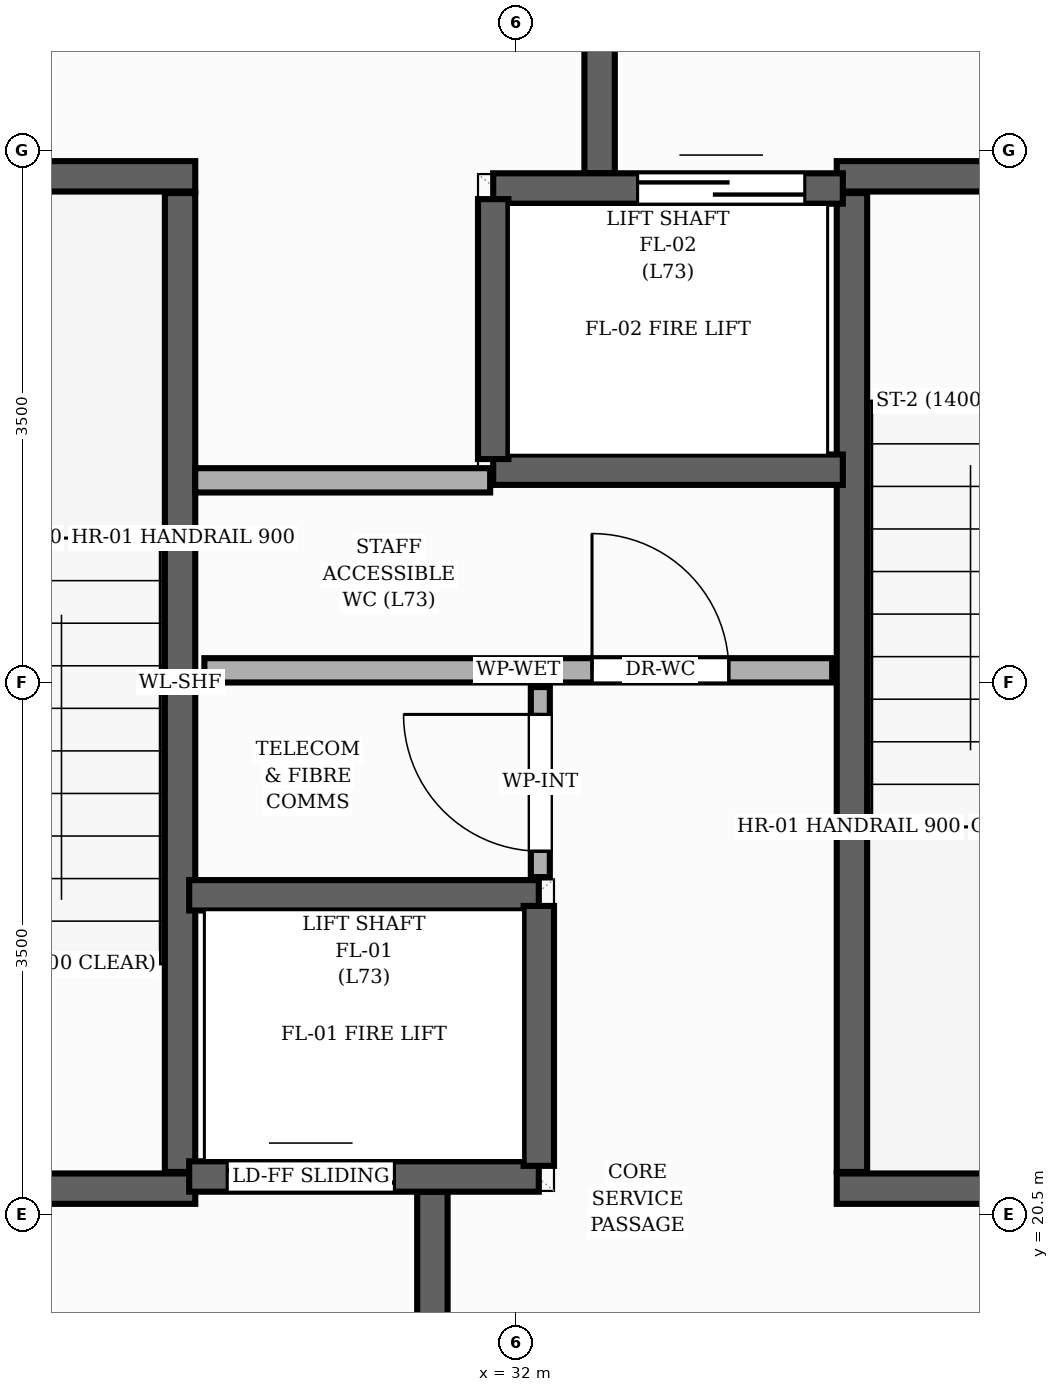
"""IFC4 building model, lengths in metres.
Left out: names, types, materials, properties, quantities, classifications, styles, units other than length and angle.
Written with IfcOpenShell. Run it as: python <this file> out.ifc"""

import sys

from ifc_helpers import new_model, si_unit, direction, frame, frame_2d, origin, place, context, subcontext, project, spatial, rectangle, extrude, element, fill, save


model = new_model("IFC4")
c1 = context("Model", 3, precision=1e-05, world=origin(), true_north=direction((0.0, 1.0)))
c2 = subcontext(c1, "Body", "Model", "MODEL_VIEW")
j1 = project(units=[si_unit("LENGTHUNIT", "METRE"), si_unit("PLANEANGLEUNIT", "RADIAN")], contexts=[c1])
p1 = place(None, origin())
s1 = spatial("IfcSite", under=j1, at=p1, CompositionType="ELEMENT")
p2 = place(p1, origin())
s2 = spatial("IfcBuilding", under=s1, at=p2, CompositionType="ELEMENT")
p3 = place(p2, frame((0.0, 0.0, 243.04)))
s3 = spatial("IfcBuildingStorey", under=s2, at=p3, CompositionType="ELEMENT", Elevation=243.04)
p4 = place(p3, frame((29.79, 20.78, 0.0), z_axis=(0.0, 0.0, 1.0), x_axis=(0.0, 1.0, 0.0)))
e1 = element("IfcWall", 1, at=p4, inside=s3, PredefinedType="SHEAR", context=c2, shape_type="SweptSolid", body=[
    extrude(rectangle(XDim=6.44, YDim=0.2, at=frame_2d((3.22, 0.0))), origin(), (0.0, 0.0, 1.0), 3.84),
])
p5 = place(p3, frame((26.65, 27.33, 0.0), z_axis=(0.0, 0.0, 1.0), x_axis=(1.0, 0.0, 0.0)))
e2 = element("IfcWall", 2, at=p5, inside=s3, PredefinedType="SHEAR", context=c2, shape_type="SweptSolid", body=[
    extrude(rectangle(XDim=3.24, YDim=0.2, at=frame_2d((1.62, 0.0))), origin(), (0.0, 0.0, 1.0), 3.84),
])
p6 = place(p3, frame((26.65, 20.67, 0.0), z_axis=(0.0, 0.0, 1.0), x_axis=(1.0, 0.0, 0.0)))
e3 = element("IfcWall", 3, at=p6, inside=s3, PredefinedType="SHEAR", context=c2, shape_type="SweptSolid", body=[
    extrude(rectangle(XDim=3.24, YDim=0.2, at=frame_2d((1.62, 0.0))), origin(), (0.0, 0.0, 1.0), 3.84),
])
p7 = place(p6, frame((1.055, 0.0, 0.0)))
e4 = element("IfcOpeningElement", 4, at=p7, cuts=e3, PredefinedType="OPENING", context=c2, shape_type="SweptSolid", body=[
    extrude(rectangle(XDim=1.05, YDim=2.15, at=frame_2d((0.525, 1.075))), frame((0.0, 0.11, 0.0), z_axis=(0.0, -1.0, 0.0), x_axis=(1.0, 0.0, 0.0)), (0.0, 0.0, 1.0), 0.22),
])
p8 = place(p3, frame((34.21, 20.78, 0.0), z_axis=(0.0, 0.0, 1.0), x_axis=(0.0, 1.0, 0.0)))
e5 = element("IfcWall", 5, at=p8, inside=s3, PredefinedType="SHEAR", context=c2, shape_type="SweptSolid", body=[
    extrude(rectangle(XDim=6.44, YDim=0.2, at=frame_2d((3.22, 0.0))), origin(), (0.0, 0.0, 1.0), 3.84),
])
p9 = place(p3, frame((34.11, 20.67, 0.0), z_axis=(0.0, 0.0, 1.0), x_axis=(1.0, 0.0, 0.0)))
e6 = element("IfcWall", 6, at=p9, inside=s3, PredefinedType="SHEAR", context=c2, shape_type="SweptSolid", body=[
    extrude(rectangle(XDim=3.24, YDim=0.2, at=frame_2d((1.62, 0.0))), origin(), (0.0, 0.0, 1.0), 3.84),
])
p10 = place(p3, frame((34.11, 27.33, 0.0), z_axis=(0.0, 0.0, 1.0), x_axis=(1.0, 0.0, 0.0)))
e7 = element("IfcWall", 7, at=p10, inside=s3, PredefinedType="SHEAR", context=c2, shape_type="SweptSolid", body=[
    extrude(rectangle(XDim=3.24, YDim=0.2, at=frame_2d((1.62, 0.0))), origin(), (0.0, 0.0, 1.0), 3.84),
])
p11 = place(p10, frame((1.135, 0.0, 0.0)))
e8 = element("IfcOpeningElement", 8, at=p11, cuts=e7, PredefinedType="OPENING", context=c2, shape_type="SweptSolid", body=[
    extrude(rectangle(XDim=1.05, YDim=2.15, at=frame_2d((0.525, 1.075))), frame((0.0, 0.11, 0.0), z_axis=(0.0, -1.0, 0.0), x_axis=(1.0, 0.0, 0.0)), (0.0, 0.0, 1.0), 0.22),
])
for number, where, z_axis, x_axis in (
    (9, (31.45, 17.15, 0.0), (0.0, 0.0, 1.0), (0.0, 1.0, 0.0)),
    (10, (32.55, 27.35, 0.0), (0.0, 0.0, 1.0), (0.0, 1.0, 0.0)),
):
    element("IfcWall", number, at=place(p3, frame(where, z_axis=z_axis, x_axis=x_axis)), inside=s3, PredefinedType="SHEAR", context=c2, shape_type="SweptSolid", body=[
        extrude(rectangle(XDim=3.5, YDim=0.2, at=frame_2d((1.75, 0.0))), origin(), (0.0, 0.0, 1.0), 3.84),
    ])
p12 = place(p3, frame((29.85, 20.75, 0.0), z_axis=(0.0, 0.0, 1.0), x_axis=(1.0, 0.0, 0.0)))
e11 = element("IfcWall", 11, at=p12, inside=s3, PredefinedType="SHEAR", context=c2, shape_type="SweptSolid", body=[
    extrude(rectangle(XDim=2.3, YDim=0.2, at=frame_2d((1.15, 0.0))), origin(), (0.0, 0.0, 1.0), 3.84),
])
p13 = place(p12, frame((0.25, 0.0, 0.0)))
e12 = element("IfcOpeningElement", 12, at=p13, cuts=e11, PredefinedType="OPENING", context=c2, shape_type="SweptSolid", body=[
    extrude(rectangle(XDim=1.1, YDim=2.15, at=frame_2d((0.55, 1.075))), frame((0.0, 0.11, 0.0), z_axis=(0.0, -1.0, 0.0), x_axis=(1.0, 0.0, 0.0)), (0.0, 0.0, 1.0), 0.22),
])
p14 = place(p3, frame((29.85, 22.6, 0.0), z_axis=(0.0, 0.0, 1.0), x_axis=(1.0, 0.0, 0.0)))
e13 = element("IfcWall", 13, at=p14, inside=s3, PredefinedType="SHEAR", context=c2, shape_type="SweptSolid", body=[
    extrude(rectangle(XDim=2.3, YDim=0.2, at=frame_2d((1.15, 0.0))), origin(), (0.0, 0.0, 1.0), 3.84),
])
p15 = place(p3, frame((32.15, 20.82, 0.0), z_axis=(0.0, 0.0, 1.0), x_axis=(0.0, 1.0, 0.0)))
e14 = element("IfcWall", 14, at=p15, inside=s3, PredefinedType="SHEAR", context=c2, shape_type="SweptSolid", body=[
    extrude(rectangle(XDim=1.71, YDim=0.2, at=frame_2d((0.855, 0.0))), origin(), (0.0, 0.0, 1.0), 3.84),
])
p16 = place(p3, frame((31.85, 27.25, 0.0), z_axis=(0.0, 0.0, 1.0), x_axis=(1.0, 0.0, 0.0)))
e15 = element("IfcWall", 15, at=p16, inside=s3, PredefinedType="SHEAR", context=c2, shape_type="SweptSolid", body=[
    extrude(rectangle(XDim=2.3, YDim=0.2, at=frame_2d((1.15, 0.0))), origin(), (0.0, 0.0, 1.0), 3.84),
])
p17 = place(p16, frame((0.95, 0.0, 0.0)))
e16 = element("IfcOpeningElement", 16, at=p17, cuts=e15, PredefinedType="OPENING", context=c2, shape_type="SweptSolid", body=[
    extrude(rectangle(XDim=1.1, YDim=2.15, at=frame_2d((0.55, 1.075))), frame((0.0, 0.11, 0.0), z_axis=(0.0, -1.0, 0.0), x_axis=(1.0, 0.0, 0.0)), (0.0, 0.0, 1.0), 0.22),
])
p18 = place(p3, frame((31.85, 25.4, 0.0), z_axis=(0.0, 0.0, 1.0), x_axis=(1.0, 0.0, 0.0)))
e17 = element("IfcWall", 17, at=p18, inside=s3, PredefinedType="SHEAR", context=c2, shape_type="SweptSolid", body=[
    extrude(rectangle(XDim=2.3, YDim=0.2, at=frame_2d((1.15, 0.0))), origin(), (0.0, 0.0, 1.0), 3.84),
])
p19 = place(p3, frame((31.85, 25.47, 0.0), z_axis=(0.0, 0.0, 1.0), x_axis=(0.0, 1.0, 0.0)))
e18 = element("IfcWall", 18, at=p19, inside=s3, PredefinedType="SHEAR", context=c2, shape_type="SweptSolid", body=[
    extrude(rectangle(XDim=1.71, YDim=0.2, at=frame_2d((0.855, 0.0))), origin(), (0.0, 0.0, 1.0), 3.84),
])
p20 = place(p3, frame((29.95, 24.08, 0.0), z_axis=(0.0, 0.0, 1.0), x_axis=(1.0, 0.0, 0.0)))
e19 = element("IfcWall", 19, at=p20, inside=s3, PredefinedType="PLUMBINGWALL", context=c2, shape_type="SweptSolid", body=[
    extrude(rectangle(XDim=4.13, YDim=0.16, at=frame_2d((2.065, 0.0))), origin(), (0.0, 0.0, 1.0), 3.515),
])
p21 = place(p20, frame((2.55, 0.0, 0.0)))
e20 = element("IfcOpeningElement", 20, at=p21, cuts=e19, PredefinedType="OPENING", context=c2, shape_type="SweptSolid", body=[
    extrude(rectangle(XDim=0.9, YDim=2.1, at=frame_2d((0.45, 1.05))), frame((0.0, 0.09, 0.0), z_axis=(0.0, -1.0, 0.0), x_axis=(1.0, 0.0, 0.0)), (0.0, 0.0, 1.0), 0.18),
])
p22 = place(p3, frame((32.16, 22.72, 0.0), z_axis=(0.0, 0.0, 1.0), x_axis=(0.0, 1.0, 0.0)))
e21 = element("IfcWall", 21, at=p22, inside=s3, PredefinedType="PARTITIONING", context=c2, shape_type="SweptSolid", body=[
    extrude(rectangle(XDim=1.25, YDim=0.125, at=frame_2d((0.625, 0.0))), origin(), (0.0, 0.0, 1.0), 3.515),
])
p23 = place(p22, frame((0.17, 0.0, 0.0)))
e22 = element("IfcOpeningElement", 22, at=p23, cuts=e21, PredefinedType="OPENING", context=c2, shape_type="SweptSolid", body=[
    extrude(rectangle(XDim=0.9, YDim=2.1, at=frame_2d((0.45, 1.05))), frame((0.0, 0.073, 0.0), z_axis=(0.0, -1.0, 0.0), x_axis=(1.0, 0.0, 0.0)), (0.0, 0.0, 1.0), 0.145),
])
p24 = place(p3, frame((29.89, 25.33, 0.0), z_axis=(0.0, 0.0, 1.0), x_axis=(1.0, 0.0, 0.0)))
e23 = element("IfcWall", 23, at=p24, inside=s3, PredefinedType="PLUMBINGWALL", context=c2, shape_type="SweptSolid", body=[
    extrude(rectangle(XDim=1.94, YDim=0.16, at=frame_2d((0.97, 0.0))), origin(), (0.0, 0.0, 1.0), 3.515),
])
p25 = place(p13, origin())
e24 = element("IfcDoor", 24, at=p25, inside=s3, OperationType="DOUBLE_DOOR_SLIDING", PredefinedType="DOOR", context=c2, shape_type="SweptSolid", body=[
    extrude(rectangle(XDim=1.1, YDim=2.15, at=frame_2d((0.55, 1.075))), frame((0.0, 0.025, 0.0), z_axis=(0.0, -1.0, 0.0), x_axis=(1.0, 0.0, 0.0)), (0.0, 0.0, 1.0), 0.05),
])
fill(e12, e24)
p26 = place(p17, origin())
e25 = element("IfcDoor", 25, at=p26, inside=s3, OperationType="DOUBLE_DOOR_SLIDING", PredefinedType="DOOR", context=c2, shape_type="SweptSolid", body=[
    extrude(rectangle(XDim=1.1, YDim=2.15, at=frame_2d((0.55, 1.075))), frame((0.0, 0.025, 0.0), z_axis=(0.0, -1.0, 0.0), x_axis=(1.0, 0.0, 0.0)), (0.0, 0.0, 1.0), 0.05),
])
fill(e16, e25)
p27 = place(p21, origin())
e26 = element("IfcDoor", 26, at=p27, inside=s3, OperationType="SINGLE_SWING_LEFT", PredefinedType="DOOR", context=c2, shape_type="SweptSolid", body=[
    extrude(rectangle(XDim=0.9, YDim=2.1, at=frame_2d((0.45, 1.05))), frame((0.0, 0.025, 0.0), z_axis=(0.0, -1.0, 0.0), x_axis=(1.0, 0.0, 0.0)), (0.0, 0.0, 1.0), 0.05),
])
fill(e20, e26)
p28 = place(p23, origin())
e27 = element("IfcDoor", 27, at=p28, inside=s3, OperationType="SINGLE_SWING_RIGHT", PredefinedType="DOOR", context=c2, shape_type="SweptSolid", body=[
    extrude(rectangle(XDim=0.9, YDim=2.1, at=frame_2d((0.45, 1.05))), frame((0.0, 0.025, 0.0), z_axis=(0.0, -1.0, 0.0), x_axis=(1.0, 0.0, 0.0)), (0.0, 0.0, 1.0), 0.05),
])
fill(e22, e27)
save(model, sys.argv[1])
